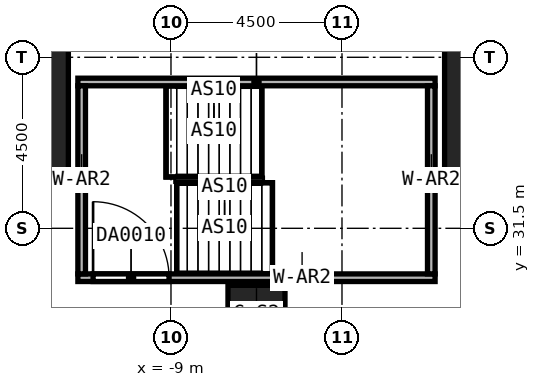
"""IFC4 building model, lengths in metres.
Left out: names, types, materials, properties, quantities, classifications, styles, units other than length and angle.
Written with IfcOpenShell. Run it as: python <this file> out.ifc"""

import sys

from ifc_helpers import new_model, si_unit, direction, frame, frame_2d, origin, origin_2d, place, context, subcontext, project, spatial, rectangle, extrude, element, fill, save


model = new_model("IFC4")
c1 = context("Model", 3, precision=1e-05, world=origin(), true_north=direction((0.0, 1.0)))
c2 = subcontext(c1, "Body", "Model", "MODEL_VIEW")
j1 = project(units=[si_unit("LENGTHUNIT", "METRE"), si_unit("PLANEANGLEUNIT", "RADIAN")], contexts=[c1])
p1 = place(None, origin())
s1 = spatial("IfcSite", under=j1, at=p1, CompositionType="ELEMENT")
p2 = place(p1, origin())
s2 = spatial("IfcBuilding", under=s1, at=p2, CompositionType="ELEMENT")
p3 = place(p2, frame((0.0, 0.0, 25.0)))
s3 = spatial("IfcBuildingStorey", under=s2, at=p3, CompositionType="ELEMENT", Elevation=25.0)
for number, where, z_axis, x_axis in (
    (1, (-13.5, 36.0, 0.0), (0.0, 0.0, 1.0), (1.0, 0.0, 0.0)),
    (2, (0.0, 36.0, 0.0), (0.0, 0.0, 1.0), (1.0, 0.0, 0.0)),
):
    element("IfcColumn", number, at=place(p3, frame(where, z_axis=z_axis, x_axis=x_axis)), inside=s3, PredefinedType="COLUMN", context=c2, shape_type="SweptSolid", body=[
        extrude(rectangle(XDim=3.6, YDim=6.0, at=origin_2d()), origin(), (0.0, 0.0, 1.0), 6.0),
    ])
p4 = place(p3, frame((-6.75, 29.25, 0.0), z_axis=(0.0, 0.0, 1.0), x_axis=(1.0, 0.0, 0.0)))
e3 = element("IfcColumn", 3, at=p4, inside=s3, PredefinedType="COLUMN", context=c2, shape_type="SweptSolid", body=[
    extrude(rectangle(XDim=1.5, YDim=1.5, at=origin_2d()), origin(), (0.0, 0.0, 1.0), 6.0),
])
p5 = place(p3, frame((-11.45, 30.2, 0.0), z_axis=(0.0, 0.0, 1.0), x_axis=(1.0, 0.0, 0.0)))
e4 = element("IfcWall", 4, at=p5, inside=s3, PredefinedType="SOLIDWALL", context=c2, shape_type="SweptSolid", body=[
    extrude(rectangle(XDim=9.4, YDim=0.2, at=frame_2d((4.7, 0.0))), origin(), (0.0, 0.0, 1.0), 6.0),
])
p6 = place(p5, frame((0.4, 0.0, 0.0)))
e5 = element("IfcOpeningElement", 5, at=p6, cuts=e4, PredefinedType="OPENING", context=c2, shape_type="SweptSolid", body=[
    extrude(rectangle(XDim=2.0, YDim=2.4, at=frame_2d((1.0, 1.2))), frame((0.0, 0.1, 0.0), z_axis=(0.0, -1.0, 0.0), x_axis=(1.0, 0.0, 0.0)), (0.0, 0.0, 1.0), 0.2),
])
p7 = place(p3, frame((-11.45, 35.35, 0.0), z_axis=(0.0, 0.0, 1.0), x_axis=(1.0, 0.0, 0.0)))
e6 = element("IfcWall", 6, at=p7, inside=s3, PredefinedType="SOLIDWALL", context=c2, shape_type="SweptSolid", body=[
    extrude(rectangle(XDim=9.4, YDim=0.2, at=frame_2d((4.7, 0.0))), origin(), (0.0, 0.0, 1.0), 6.0),
])
for number, where, z_axis, x_axis in (
    (7, (-11.35, 30.3, 0.0), (0.0, 0.0, 1.0), (0.0, 1.0, 0.0)),
    (8, (-2.15, 30.3, 0.0), (0.0, 0.0, 1.0), (0.0, 1.0, 0.0)),
):
    element("IfcWall", number, at=place(p3, frame(where, z_axis=z_axis, x_axis=x_axis)), inside=s3, PredefinedType="SOLIDWALL", context=c2, shape_type="SweptSolid", body=[
        extrude(rectangle(XDim=4.95, YDim=0.2, at=frame_2d((2.475, 0.0))), origin(), (0.0, 0.0, 1.0), 6.0),
    ])
p8 = place(p6, origin())
e9 = element("IfcDoor", 9, at=p8, inside=s3, OperationType="DOUBLE_DOOR_SINGLE_SWING", PredefinedType="DOOR", context=c2, shape_type="SweptSolid", body=[
    extrude(rectangle(XDim=2.0, YDim=2.4, at=frame_2d((1.0, 1.2))), frame((0.0, 0.025, 0.0), z_axis=(0.0, -1.0, 0.0), x_axis=(1.0, 0.0, 0.0)), (0.0, 0.0, 1.0), 0.05),
])
fill(e5, e9)
save(model, sys.argv[1])
